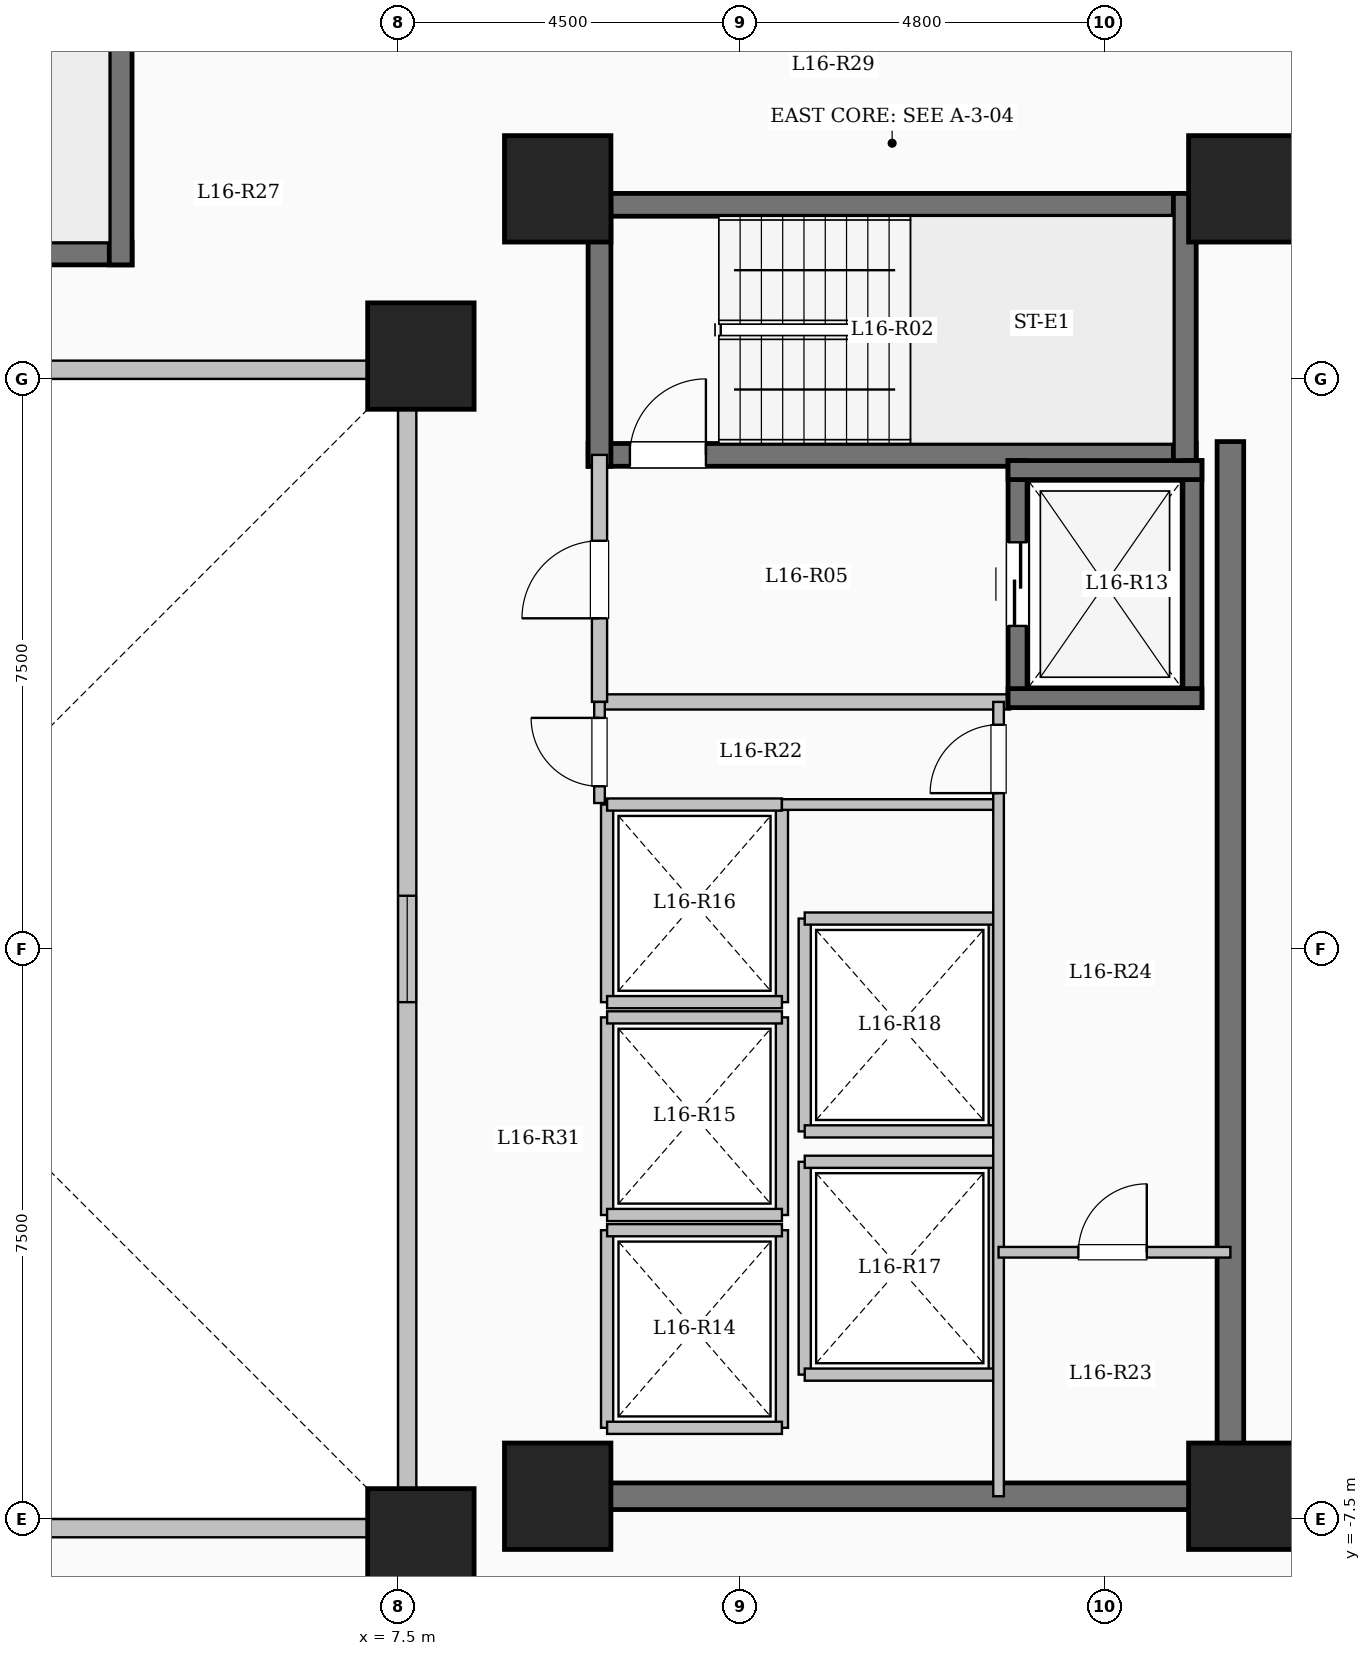
"""IFC4 building model, lengths in metres.
Left out: names, types, materials, properties, quantities, classifications, styles, units other than length and angle.
Written with IfcOpenShell. Run it as: python <this file> out.ifc"""

import sys

from ifc_helpers import new_model, si_unit, direction, frame, frame_2d, origin, origin_2d, place, context, subcontext, project, spatial, rectangle, extrude, element, fill, save


model = new_model("IFC4")
c1 = context("Model", 3, precision=1e-05, world=origin(), true_north=direction((0.0, 1.0)))
c2 = subcontext(c1, "Body", "Model", "MODEL_VIEW")
j1 = project(units=[si_unit("LENGTHUNIT", "METRE"), si_unit("PLANEANGLEUNIT", "RADIAN")], contexts=[c1])
p1 = place(None, origin())
s1 = spatial("IfcSite", under=j1, at=p1, CompositionType="ELEMENT")
p2 = place(p1, origin())
s2 = spatial("IfcBuilding", under=s1, at=p2, CompositionType="ELEMENT")
p3 = place(p2, frame((0.0, 0.0, 60.85)))
s3 = spatial("IfcBuildingStorey", under=s2, at=p3, CompositionType="ELEMENT", Elevation=60.85)
for number, where, z_axis, x_axis in (
    (1, (7.8, -7.8, 0.0), (0.0, 0.0, 1.0), (1.0, 0.0, 0.0)),
    (2, (7.8, 7.8, 0.0), (0.0, 0.0, 1.0), (1.0, 0.0, 0.0)),
    (3, (9.6, -7.2, 0.0), (0.0, 0.0, 1.0), (1.0, 0.0, 0.0)),
    (4, (9.6, 10.0, 0.0), (0.0, 0.0, 1.0), (1.0, 0.0, 0.0)),
    (5, (18.6, -7.2, 0.0), (0.0, 0.0, 1.0), (1.0, 0.0, 0.0)),
    (6, (18.6, 10.0, 0.0), (0.0, 0.0, 1.0), (1.0, 0.0, 0.0)),
):
    element("IfcColumn", number, at=place(p3, frame(where, z_axis=z_axis, x_axis=x_axis)), inside=s3, PredefinedType="COLUMN", context=c2, shape_type="SweptSolid", body=[
        extrude(rectangle(XDim=1.4, YDim=1.4, at=origin_2d()), origin(), (0.0, 0.0, 1.0), 3.35),
    ])
p4 = place(p3, frame((-7.62, -7.62, 0.0), z_axis=(0.0, 0.0, 1.0), x_axis=(1.0, 0.0, 0.0)))
e7 = element("IfcWall", 7, at=p4, inside=s3, PredefinedType="SOLIDWALL", context=c2, shape_type="SweptSolid", body=[
    extrude(rectangle(XDim=15.24, YDim=0.24, at=frame_2d((7.62, 0.0))), origin(), (0.0, 0.0, 1.0), 3.05),
])
p5 = place(p4, frame((6.92, 0.0, 0.95)))
e8 = element("IfcOpeningElement", 8, at=p5, cuts=e7, PredefinedType="OPENING", context=c2, shape_type="SweptSolid", body=[
    extrude(rectangle(XDim=1.4, YDim=1.5, at=frame_2d((0.7, 0.75))), frame((0.0, 0.13, 0.0), z_axis=(0.0, -1.0, 0.0), x_axis=(1.0, 0.0, 0.0)), (0.0, 0.0, 1.0), 0.26),
])
p6 = place(p3, frame((7.62, -7.62, 0.0), z_axis=(0.0, 0.0, 1.0), x_axis=(0.0, 1.0, 0.0)))
e9 = element("IfcWall", 9, at=p6, inside=s3, PredefinedType="SOLIDWALL", context=c2, shape_type="SweptSolid", body=[
    extrude(rectangle(XDim=15.24, YDim=0.24, at=frame_2d((7.62, 0.0))), origin(), (0.0, 0.0, 1.0), 3.05),
])
p7 = place(p6, frame((6.92, 0.0, 0.95)))
e10 = element("IfcOpeningElement", 10, at=p7, cuts=e9, PredefinedType="OPENING", context=c2, shape_type="SweptSolid", body=[
    extrude(rectangle(XDim=1.4, YDim=1.5, at=frame_2d((0.7, 0.75))), frame((0.0, 0.13, 0.0), z_axis=(0.0, -1.0, 0.0), x_axis=(1.0, 0.0, 0.0)), (0.0, 0.0, 1.0), 0.26),
])
p8 = place(p3, frame((7.62, 7.62, 0.0), z_axis=(0.0, 0.0, 1.0), x_axis=(-1.0, 0.0, 0.0)))
e11 = element("IfcWall", 11, at=p8, inside=s3, PredefinedType="SOLIDWALL", context=c2, shape_type="SweptSolid", body=[
    extrude(rectangle(XDim=15.24, YDim=0.24, at=frame_2d((7.62, 0.0))), origin(), (0.0, 0.0, 1.0), 3.05),
])
p9 = place(p8, frame((6.92, 0.0, 0.95)))
e12 = element("IfcOpeningElement", 12, at=p9, cuts=e11, PredefinedType="OPENING", context=c2, shape_type="SweptSolid", body=[
    extrude(rectangle(XDim=1.4, YDim=1.5, at=frame_2d((0.7, 0.75))), frame((0.0, 0.13, 0.0), z_axis=(0.0, -1.0, 0.0), x_axis=(1.0, 0.0, 0.0)), (0.0, 0.0, 1.0), 0.26),
])
p10 = place(p3, frame((10.0, 9.79, 0.0), z_axis=(0.0, 0.0, 1.0), x_axis=(1.0, 0.0, 0.0)))
e13 = element("IfcWall", 13, at=p10, inside=s3, PredefinedType="SHEAR", context=c2, shape_type="SweptSolid", body=[
    extrude(rectangle(XDim=8.0, YDim=0.3, at=frame_2d((4.0, 0.0))), origin(), (0.0, 0.0, 1.0), 3.35),
])
p11 = place(p3, frame((10.0, 6.5, 0.0), z_axis=(0.0, 0.0, 1.0), x_axis=(1.0, 0.0, 0.0)))
e14 = element("IfcWall", 14, at=p11, inside=s3, PredefinedType="SHEAR", context=c2, shape_type="SweptSolid", body=[
    extrude(rectangle(XDim=8.0, YDim=0.3, at=frame_2d((4.0, 0.0))), origin(), (0.0, 0.0, 1.0), 3.35),
])
p12 = place(p11, frame((0.55, 0.0, 0.0)))
e15 = element("IfcOpeningElement", 15, at=p12, cuts=e14, PredefinedType="OPENING", context=c2, shape_type="SweptSolid", body=[
    extrude(rectangle(XDim=1.0, YDim=2.15, at=frame_2d((0.5, 1.075))), frame((0.0, 0.16, 0.0), z_axis=(0.0, -1.0, 0.0), x_axis=(1.0, 0.0, 0.0)), (0.0, 0.0, 1.0), 0.32),
])
for number, where, z_axis, x_axis in (
    (16, (10.15, 6.35, 0.0), (0.0, 0.0, 1.0), (0.0, 1.0, 0.0)),
    (17, (17.85, 6.35, 0.0), (0.0, 0.0, 1.0), (0.0, 1.0, 0.0)),
):
    element("IfcWall", number, at=place(p3, frame(where, z_axis=z_axis, x_axis=x_axis)), inside=s3, PredefinedType="SHEAR", context=c2, shape_type="SweptSolid", body=[
        extrude(rectangle(XDim=3.59, YDim=0.3, at=frame_2d((1.795, 0.0))), origin(), (0.0, 0.0, 1.0), 3.35),
    ])
p13 = place(p3, frame((-4.0, 9.15, 0.0), z_axis=(0.0, 0.0, 1.0), x_axis=(1.0, 0.0, 0.0)))
e18 = element("IfcWall", 18, at=p13, inside=s3, PredefinedType="SHEAR", context=c2, shape_type="SweptSolid", body=[
    extrude(rectangle(XDim=8.0, YDim=0.3, at=frame_2d((4.0, 0.0))), origin(), (0.0, 0.0, 1.0), 3.35),
])
p14 = place(p13, frame((0.55, 0.0, 0.0)))
e19 = element("IfcOpeningElement", 19, at=p14, cuts=e18, PredefinedType="OPENING", context=c2, shape_type="SweptSolid", body=[
    extrude(rectangle(XDim=1.0, YDim=2.15, at=frame_2d((0.5, 1.075))), frame((0.0, 0.16, 0.0), z_axis=(0.0, -1.0, 0.0), x_axis=(1.0, 0.0, 0.0)), (0.0, 0.0, 1.0), 0.32),
])
p15 = place(p3, frame((3.85, 9.0, 0.0), z_axis=(0.0, 0.0, 1.0), x_axis=(0.0, 1.0, 0.0)))
e20 = element("IfcWall", 20, at=p15, inside=s3, PredefinedType="SHEAR", context=c2, shape_type="SweptSolid", body=[
    extrude(rectangle(XDim=3.59, YDim=0.3, at=frame_2d((1.795, 0.0))), origin(), (0.0, 0.0, 1.0), 3.35),
])
p16 = place(p3, frame((10.15, 3.25, 0.0), z_axis=(0.0, 0.0, 1.0), x_axis=(1.0, 0.0, 0.0)))
e21 = element("IfcWall", 21, at=p16, inside=s3, PredefinedType="SOLIDWALL", context=c2, shape_type="SweptSolid", body=[
    extrude(rectangle(XDim=5.4, YDim=0.2, at=frame_2d((2.7, 0.0))), origin(), (0.0, 0.0, 1.0), 3.05),
])
p17 = place(p3, frame((10.15, 3.25, 0.0), z_axis=(0.0, 0.0, 1.0), x_axis=(0.0, 1.0, 0.0)))
e22 = element("IfcWall", 22, at=p17, inside=s3, PredefinedType="SOLIDWALL", context=c2, shape_type="SweptSolid", body=[
    extrude(rectangle(XDim=3.25, YDim=0.2, at=frame_2d((1.625, 0.0))), origin(), (0.0, 0.0, 1.0), 3.05),
])
p18 = place(p17, frame((1.1, 0.0, 0.0)))
e23 = element("IfcOpeningElement", 23, at=p18, cuts=e22, PredefinedType="OPENING", context=c2, shape_type="SweptSolid", body=[
    extrude(rectangle(XDim=1.02, YDim=2.15, at=frame_2d((0.51, 1.075))), frame((0.0, 0.11, 0.0), z_axis=(0.0, -1.0, 0.0), x_axis=(1.0, 0.0, 0.0)), (0.0, 0.0, 1.0), 0.22),
])
p19 = place(p3, frame((15.65, 3.175, 0.0), z_axis=(0.0, 0.0, 1.0), x_axis=(0.0, 1.0, 0.0)))
e24 = element("IfcWall", 24, at=p19, inside=s3, PredefinedType="SHEAR", context=c2, shape_type="SweptSolid", body=[
    extrude(rectangle(XDim=3.25, YDim=0.25, at=frame_2d((1.625, 0.0))), origin(), (0.0, 0.0, 1.0), 3.35),
])
p20 = place(p19, frame((1.075, 0.0, 0.0)))
e25 = element("IfcOpeningElement", 25, at=p20, cuts=e24, PredefinedType="OPENING", context=c2, shape_type="SweptSolid", body=[
    extrude(rectangle(XDim=1.1, YDim=2.15, at=frame_2d((0.55, 1.075))), frame((0.0, 0.135, 0.0), z_axis=(0.0, -1.0, 0.0), x_axis=(1.0, 0.0, 0.0)), (0.0, 0.0, 1.0), 0.27),
])
p21 = place(p3, frame((17.95, 3.175, 0.0), z_axis=(0.0, 0.0, 1.0), x_axis=(0.0, 1.0, 0.0)))
e26 = element("IfcWall", 26, at=p21, inside=s3, PredefinedType="SHEAR", context=c2, shape_type="SweptSolid", body=[
    extrude(rectangle(XDim=3.25, YDim=0.25, at=frame_2d((1.625, 0.0))), origin(), (0.0, 0.0, 1.0), 3.35),
])
for number, where, z_axis, x_axis in (
    (27, (15.525, 3.3, 0.0), (0.0, 0.0, 1.0), (1.0, 0.0, 0.0)),
    (28, (15.525, 6.3, 0.0), (0.0, 0.0, 1.0), (1.0, 0.0, 0.0)),
):
    element("IfcWall", number, at=place(p3, frame(where, z_axis=z_axis, x_axis=x_axis)), inside=s3, PredefinedType="SHEAR", context=c2, shape_type="SweptSolid", body=[
        extrude(rectangle(XDim=2.55, YDim=0.25, at=frame_2d((1.275, 0.0))), origin(), (0.0, 0.0, 1.0), 3.35),
    ])
for number, where, z_axis, x_axis in (
    (29, (10.25, -6.3, 0.0), (0.0, 0.0, 1.0), (0.0, 1.0, 0.0)),
    (30, (12.55, -6.3, 0.0), (0.0, 0.0, 1.0), (0.0, 1.0, 0.0)),
):
    element("IfcWall", number, at=place(p3, frame(where, z_axis=z_axis, x_axis=x_axis)), inside=s3, PredefinedType="SOLIDWALL", context=c2, shape_type="SweptSolid", body=[
        extrude(rectangle(XDim=2.6, YDim=0.16, at=frame_2d((1.3, 0.0))), origin(), (0.0, 0.0, 1.0), 3.05),
    ])
for number, where, z_axis, x_axis in (
    (31, (10.25, -6.3, 0.0), (0.0, 0.0, 1.0), (1.0, 0.0, 0.0)),
    (32, (10.25, -3.7, 0.0), (0.0, 0.0, 1.0), (1.0, 0.0, 0.0)),
):
    element("IfcWall", number, at=place(p3, frame(where, z_axis=z_axis, x_axis=x_axis)), inside=s3, PredefinedType="SOLIDWALL", context=c2, shape_type="SweptSolid", body=[
        extrude(rectangle(XDim=2.3, YDim=0.16, at=frame_2d((1.15, 0.0))), origin(), (0.0, 0.0, 1.0), 3.05),
    ])
for number, where, z_axis, x_axis in (
    (33, (10.25, -3.5, 0.0), (0.0, 0.0, 1.0), (0.0, 1.0, 0.0)),
    (34, (12.55, -3.5, 0.0), (0.0, 0.0, 1.0), (0.0, 1.0, 0.0)),
):
    element("IfcWall", number, at=place(p3, frame(where, z_axis=z_axis, x_axis=x_axis)), inside=s3, PredefinedType="SOLIDWALL", context=c2, shape_type="SweptSolid", body=[
        extrude(rectangle(XDim=2.6, YDim=0.16, at=frame_2d((1.3, 0.0))), origin(), (0.0, 0.0, 1.0), 3.05),
    ])
for number, where, z_axis, x_axis in (
    (35, (10.25, -3.5, 0.0), (0.0, 0.0, 1.0), (1.0, 0.0, 0.0)),
    (36, (10.25, -0.9, 0.0), (0.0, 0.0, 1.0), (1.0, 0.0, 0.0)),
):
    element("IfcWall", number, at=place(p3, frame(where, z_axis=z_axis, x_axis=x_axis)), inside=s3, PredefinedType="SOLIDWALL", context=c2, shape_type="SweptSolid", body=[
        extrude(rectangle(XDim=2.3, YDim=0.16, at=frame_2d((1.15, 0.0))), origin(), (0.0, 0.0, 1.0), 3.05),
    ])
for number, where, z_axis, x_axis in (
    (37, (10.25, -0.7, 0.0), (0.0, 0.0, 1.0), (0.0, 1.0, 0.0)),
    (38, (12.55, -0.7, 0.0), (0.0, 0.0, 1.0), (0.0, 1.0, 0.0)),
):
    element("IfcWall", number, at=place(p3, frame(where, z_axis=z_axis, x_axis=x_axis)), inside=s3, PredefinedType="SOLIDWALL", context=c2, shape_type="SweptSolid", body=[
        extrude(rectangle(XDim=2.6, YDim=0.16, at=frame_2d((1.3, 0.0))), origin(), (0.0, 0.0, 1.0), 3.05),
    ])
for number, where, z_axis, x_axis in (
    (39, (10.25, -0.7, 0.0), (0.0, 0.0, 1.0), (1.0, 0.0, 0.0)),
    (40, (10.25, 1.9, 0.0), (0.0, 0.0, 1.0), (1.0, 0.0, 0.0)),
):
    element("IfcWall", number, at=place(p3, frame(where, z_axis=z_axis, x_axis=x_axis)), inside=s3, PredefinedType="SOLIDWALL", context=c2, shape_type="SweptSolid", body=[
        extrude(rectangle(XDim=2.3, YDim=0.16, at=frame_2d((1.15, 0.0))), origin(), (0.0, 0.0, 1.0), 3.05),
    ])
for number, where, z_axis, x_axis in (
    (41, (12.85, -5.6, 0.0), (0.0, 0.0, 1.0), (0.0, 1.0, 0.0)),
    (42, (15.35, -5.6, 0.0), (0.0, 0.0, 1.0), (0.0, 1.0, 0.0)),
):
    element("IfcWall", number, at=place(p3, frame(where, z_axis=z_axis, x_axis=x_axis)), inside=s3, PredefinedType="SOLIDWALL", context=c2, shape_type="SweptSolid", body=[
        extrude(rectangle(XDim=2.8, YDim=0.16, at=frame_2d((1.4, 0.0))), origin(), (0.0, 0.0, 1.0), 3.05),
    ])
for number, where, z_axis, x_axis in (
    (43, (12.85, -5.6, 0.0), (0.0, 0.0, 1.0), (1.0, 0.0, 0.0)),
    (44, (12.85, -2.8, 0.0), (0.0, 0.0, 1.0), (1.0, 0.0, 0.0)),
):
    element("IfcWall", number, at=place(p3, frame(where, z_axis=z_axis, x_axis=x_axis)), inside=s3, PredefinedType="SOLIDWALL", context=c2, shape_type="SweptSolid", body=[
        extrude(rectangle(XDim=2.5, YDim=0.16, at=frame_2d((1.25, 0.0))), origin(), (0.0, 0.0, 1.0), 3.05),
    ])
for number, where, z_axis, x_axis in (
    (45, (12.85, -2.4, 0.0), (0.0, 0.0, 1.0), (0.0, 1.0, 0.0)),
    (46, (15.35, -2.4, 0.0), (0.0, 0.0, 1.0), (0.0, 1.0, 0.0)),
):
    element("IfcWall", number, at=place(p3, frame(where, z_axis=z_axis, x_axis=x_axis)), inside=s3, PredefinedType="SOLIDWALL", context=c2, shape_type="SweptSolid", body=[
        extrude(rectangle(XDim=2.8, YDim=0.16, at=frame_2d((1.4, 0.0))), origin(), (0.0, 0.0, 1.0), 3.05),
    ])
for number, where, z_axis, x_axis in (
    (47, (12.85, -2.4, 0.0), (0.0, 0.0, 1.0), (1.0, 0.0, 0.0)),
    (48, (12.85, 0.4, 0.0), (0.0, 0.0, 1.0), (1.0, 0.0, 0.0)),
):
    element("IfcWall", number, at=place(p3, frame(where, z_axis=z_axis, x_axis=x_axis)), inside=s3, PredefinedType="SOLIDWALL", context=c2, shape_type="SweptSolid", body=[
        extrude(rectangle(XDim=2.5, YDim=0.16, at=frame_2d((1.25, 0.0))), origin(), (0.0, 0.0, 1.0), 3.05),
    ])
p22 = place(p3, frame((18.45, -7.375, 0.0), z_axis=(0.0, 0.0, 1.0), x_axis=(0.0, 1.0, 0.0)))
e49 = element("IfcWall", 49, at=p22, inside=s3, PredefinedType="SHEAR", context=c2, shape_type="SweptSolid", body=[
    extrude(rectangle(XDim=14.05, YDim=0.35, at=frame_2d((7.025, 0.0))), origin(), (0.0, 0.0, 1.0), 3.35),
])
p23 = place(p3, frame((10.075, -7.2, 0.0), z_axis=(0.0, 0.0, 1.0), x_axis=(1.0, 0.0, 0.0)))
e50 = element("IfcWall", 50, at=p23, inside=s3, PredefinedType="SHEAR", context=c2, shape_type="SweptSolid", body=[
    extrude(rectangle(XDim=8.55, YDim=0.35, at=frame_2d((4.275, 0.0))), origin(), (0.0, 0.0, 1.0), 3.35),
])
p24 = place(p3, frame((12.55, 1.9, 0.0), z_axis=(0.0, 0.0, 1.0), x_axis=(1.0, 0.0, 0.0)))
e51 = element("IfcWall", 51, at=p24, inside=s3, PredefinedType="PARTITIONING", context=c2, shape_type="SweptSolid", body=[
    extrude(rectangle(XDim=2.85, YDim=0.14, at=frame_2d((1.425, 0.0))), origin(), (0.0, 0.0, 1.0), 3.05),
])
p25 = place(p3, frame((10.15, 1.92, 0.0), z_axis=(0.0, 0.0, 1.0), x_axis=(0.0, 1.0, 0.0)))
e52 = element("IfcWall", 52, at=p25, inside=s3, PredefinedType="PARTITIONING", context=c2, shape_type="SweptSolid", body=[
    extrude(rectangle(XDim=1.33, YDim=0.14, at=frame_2d((0.665, 0.0))), origin(), (0.0, 0.0, 1.0), 3.05),
])
p26 = place(p25, frame((0.22, 0.0, 0.0)))
e53 = element("IfcOpeningElement", 53, at=p26, cuts=e52, PredefinedType="OPENING", context=c2, shape_type="SweptSolid", body=[
    extrude(rectangle(XDim=0.9, YDim=2.08, at=frame_2d((0.45, 1.04))), frame((0.0, 0.08, 0.0), z_axis=(0.0, -1.0, 0.0), x_axis=(1.0, 0.0, 0.0)), (0.0, 0.0, 1.0), 0.16),
])
p27 = place(p3, frame((15.4, -7.2, 0.0), z_axis=(0.0, 0.0, 1.0), x_axis=(0.0, 1.0, 0.0)))
e54 = element("IfcWall", 54, at=p27, inside=s3, PredefinedType="PARTITIONING", context=c2, shape_type="SweptSolid", body=[
    extrude(rectangle(XDim=10.45, YDim=0.14, at=frame_2d((5.225, 0.0))), origin(), (0.0, 0.0, 1.0), 3.05),
])
p28 = place(p27, frame((9.25, 0.0, 0.0)))
e55 = element("IfcOpeningElement", 55, at=p28, cuts=e54, PredefinedType="OPENING", context=c2, shape_type="SweptSolid", body=[
    extrude(rectangle(XDim=0.9, YDim=2.08, at=frame_2d((0.45, 1.04))), frame((0.0, 0.08, 0.0), z_axis=(0.0, -1.0, 0.0), x_axis=(1.0, 0.0, 0.0)), (0.0, 0.0, 1.0), 0.16),
])
p29 = place(p3, frame((15.4, -3.99, 0.0), z_axis=(0.0, 0.0, 1.0), x_axis=(1.0, 0.0, 0.0)))
e56 = element("IfcWall", 56, at=p29, inside=s3, PredefinedType="PARTITIONING", context=c2, shape_type="SweptSolid", body=[
    extrude(rectangle(XDim=3.05, YDim=0.14, at=frame_2d((1.525, 0.0))), origin(), (0.0, 0.0, 1.0), 3.05),
])
p30 = place(p29, frame((1.05, 0.0, 0.0)))
e57 = element("IfcOpeningElement", 57, at=p30, cuts=e56, PredefinedType="OPENING", context=c2, shape_type="SweptSolid", body=[
    extrude(rectangle(XDim=0.9, YDim=2.08, at=frame_2d((0.45, 1.04))), frame((0.0, 0.08, 0.0), z_axis=(0.0, -1.0, 0.0), x_axis=(1.0, 0.0, 0.0)), (0.0, 0.0, 1.0), 0.16),
])
p31 = place(p7, origin())
e58 = element("IfcWindow", 58, at=p31, inside=s3, PartitioningType="SINGLE_PANEL", PredefinedType="WINDOW", context=c2, shape_type="SweptSolid", body=[
    extrude(rectangle(XDim=1.4, YDim=1.5, at=frame_2d((0.7, 0.75))), frame((0.0, 0.03, 0.0), z_axis=(0.0, -1.0, 0.0), x_axis=(1.0, 0.0, 0.0)), (0.0, 0.0, 1.0), 0.06),
])
fill(e10, e58)
p32 = place(p12, origin())
e59 = element("IfcDoor", 59, at=p32, inside=s3, OperationType="SINGLE_SWING_RIGHT", PredefinedType="DOOR", context=c2, shape_type="SweptSolid", body=[
    extrude(rectangle(XDim=1.0, YDim=2.15, at=frame_2d((0.5, 1.075))), frame((0.0, 0.025, 0.0), z_axis=(0.0, -1.0, 0.0), x_axis=(1.0, 0.0, 0.0)), (0.0, 0.0, 1.0), 0.05),
])
fill(e15, e59)
p33 = place(p18, origin())
e60 = element("IfcDoor", 60, at=p33, inside=s3, OperationType="SINGLE_SWING_LEFT", PredefinedType="DOOR", context=c2, shape_type="SweptSolid", body=[
    extrude(rectangle(XDim=1.02, YDim=2.15, at=frame_2d((0.51, 1.075))), frame((0.0, 0.025, 0.0), z_axis=(0.0, -1.0, 0.0), x_axis=(1.0, 0.0, 0.0)), (0.0, 0.0, 1.0), 0.05),
])
fill(e23, e60)
p34 = place(p20, origin())
e61 = element("IfcDoor", 61, at=p34, inside=s3, OperationType="SLIDING_TO_LEFT", PredefinedType="DOOR", context=c2, shape_type="SweptSolid", body=[
    extrude(rectangle(XDim=1.1, YDim=2.15, at=frame_2d((0.55, 1.075))), frame((0.0, 0.025, 0.0), z_axis=(0.0, -1.0, 0.0), x_axis=(1.0, 0.0, 0.0)), (0.0, 0.0, 1.0), 0.05),
])
fill(e25, e61)
p35 = place(p26, origin())
e62 = element("IfcDoor", 62, at=p35, inside=s3, OperationType="SINGLE_SWING_RIGHT", PredefinedType="DOOR", context=c2, shape_type="SweptSolid", body=[
    extrude(rectangle(XDim=0.9, YDim=2.08, at=frame_2d((0.45, 1.04))), frame((0.0, 0.025, 0.0), z_axis=(0.0, -1.0, 0.0), x_axis=(1.0, 0.0, 0.0)), (0.0, 0.0, 1.0), 0.05),
])
fill(e53, e62)
p36 = place(p28, origin())
e63 = element("IfcDoor", 63, at=p36, inside=s3, OperationType="SINGLE_SWING_LEFT", PredefinedType="DOOR", context=c2, shape_type="SweptSolid", body=[
    extrude(rectangle(XDim=0.9, YDim=2.08, at=frame_2d((0.45, 1.04))), frame((0.0, 0.025, 0.0), z_axis=(0.0, -1.0, 0.0), x_axis=(1.0, 0.0, 0.0)), (0.0, 0.0, 1.0), 0.05),
])
fill(e55, e63)
p37 = place(p30, origin())
e64 = element("IfcDoor", 64, at=p37, inside=s3, OperationType="SINGLE_SWING_RIGHT", PredefinedType="DOOR", context=c2, shape_type="SweptSolid", body=[
    extrude(rectangle(XDim=0.9, YDim=2.08, at=frame_2d((0.45, 1.04))), frame((0.0, 0.025, 0.0), z_axis=(0.0, -1.0, 0.0), x_axis=(1.0, 0.0, 0.0)), (0.0, 0.0, 1.0), 0.05),
])
fill(e57, e64)
save(model, sys.argv[1])
